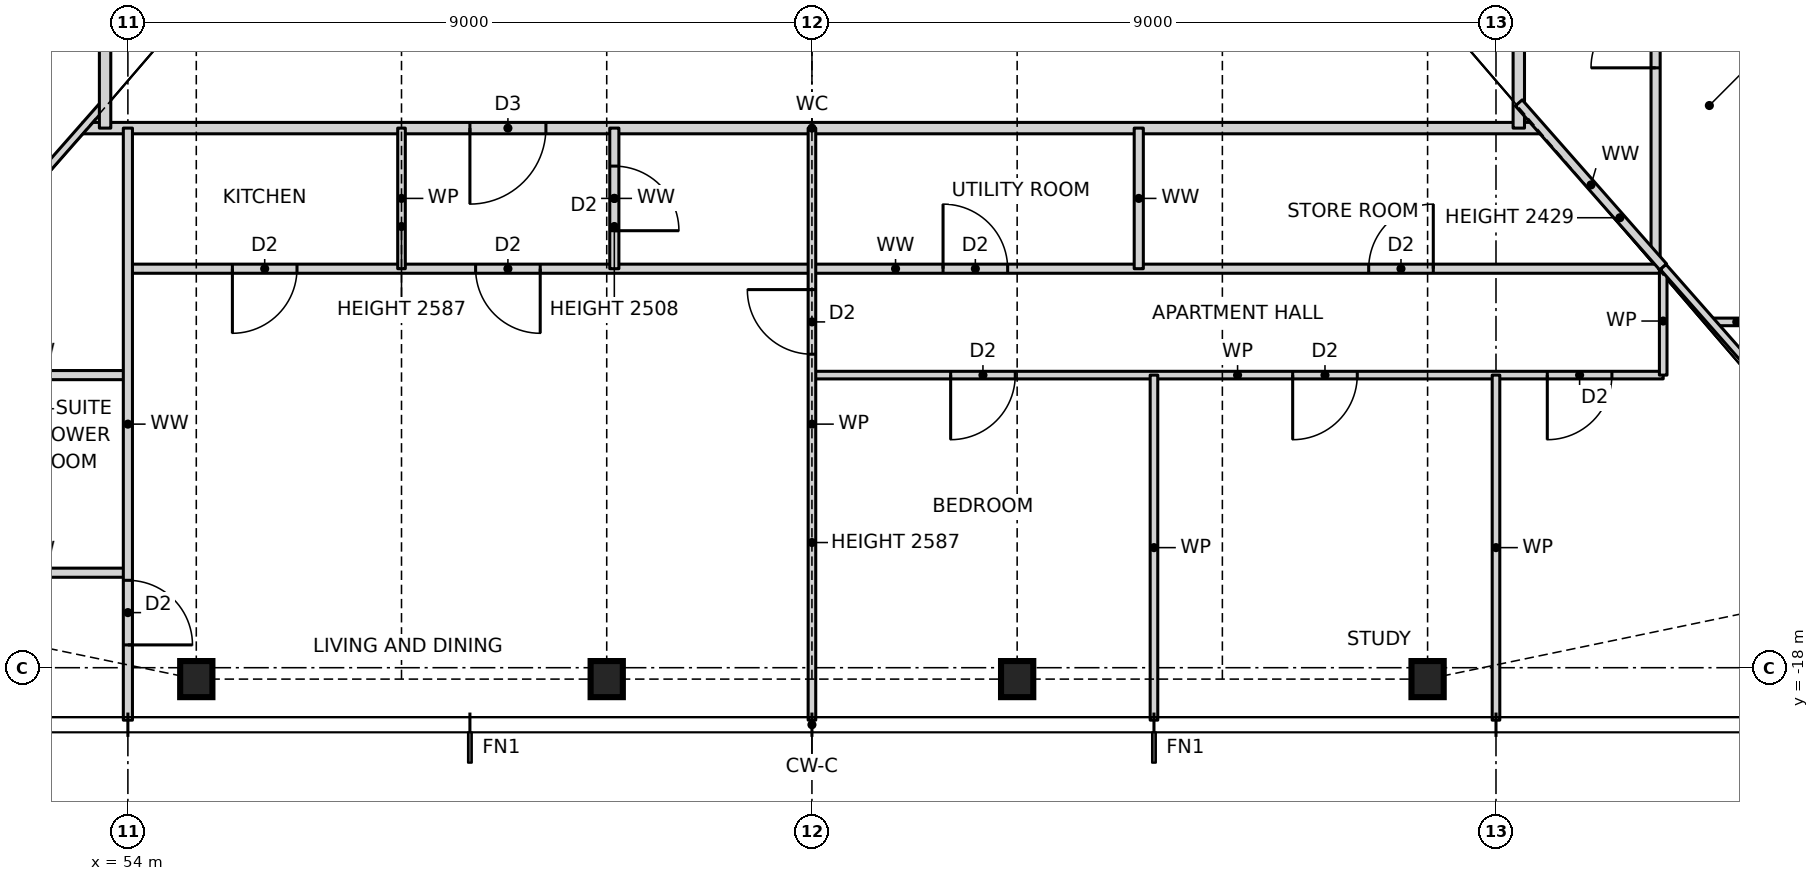
"""IFC4 building model, lengths in metres.
Left out: names, types, materials, properties, quantities, classifications, styles, units other than length and angle.
Written with IfcOpenShell. Run it as: python <this file> out.ifc"""

import sys

from ifc_helpers import new_model, si_unit, direction, frame, frame_2d, origin, origin_2d, place, context, subcontext, project, spatial, rectangle, i_section, extrude, element, fill, save


model = new_model("IFC4")
c1 = context("Model", 3, precision=1e-05, world=origin(), true_north=direction((0.0, 1.0)))
c2 = subcontext(c1, "Body", "Model", "MODEL_VIEW")
j1 = project(units=[si_unit("LENGTHUNIT", "METRE"), si_unit("PLANEANGLEUNIT", "RADIAN")], contexts=[c1])
p1 = place(None, origin())
s1 = spatial("IfcSite", under=j1, at=p1, CompositionType="ELEMENT")
p2 = place(p1, origin())
s2 = spatial("IfcBuilding", under=s1, at=p2, CompositionType="ELEMENT")
p3 = place(p2, frame((0.0, 0.0, 15.0)))
s3 = spatial("IfcBuildingStorey", under=s2, at=p3, CompositionType="ELEMENT", Elevation=15.0)
for number, where, z_axis, x_axis in (
    (1, (54.9, -18.15, 0.0), (0.0, 0.0, 1.0), (1.0, 0.0, 0.0)),
    (2, (60.3, -18.15, 0.0), (0.0, 0.0, 1.0), (1.0, 0.0, 0.0)),
    (3, (65.7, -18.15, 0.0), (0.0, 0.0, 1.0), (1.0, 0.0, 0.0)),
    (4, (71.1, -18.15, 0.0), (0.0, 0.0, 1.0), (1.0, 0.0, 0.0)),
):
    element("IfcColumn", number, at=place(p3, frame(where, z_axis=z_axis, x_axis=x_axis)), inside=s3, PredefinedType="COLUMN", context=c2, shape_type="SweptSolid", body=[
        extrude(i_section(OverallWidth=0.424, OverallDepth=0.475, WebThickness=0.048, FlangeThickness=0.077, at=origin_2d()), origin(), (0.0, 0.0, 1.0), 3.5),
    ])
for number, where, z_axis, x_axis in (
    (5, (51.6, -16.75, 0.0), (0.0, 0.0, 1.0), (1.0, 0.0, 0.0)),
    (6, (51.6, -14.15, 0.0), (0.0, 0.0, 1.0), (1.0, 0.0, 0.0)),
):
    element("IfcWall", number, at=place(p3, frame(where, z_axis=z_axis, x_axis=x_axis)), inside=s3, PredefinedType="PARTITIONING", context=c2, shape_type="SweptSolid", body=[
        extrude(rectangle(XDim=2.4, YDim=0.12, at=frame_2d((1.2, 0.0))), origin(), (0.0, 0.0, 1.0), 3.27),
    ])
p4 = place(p3, frame((63.0, -14.15, 0.0), z_axis=(0.0, 0.0, 1.0), x_axis=(1.0, 0.0, 0.0)))
e7 = element("IfcWall", 7, at=p4, inside=s3, PredefinedType="PARTITIONING", context=c2, shape_type="SweptSolid", body=[
    extrude(rectangle(XDim=11.2, YDim=0.1, at=frame_2d((5.6, 0.0))), origin(), (0.0, 0.0, 1.0), 3.27),
])
p5 = place(p4, frame((1.825, 0.0, 0.0)))
e8 = element("IfcOpeningElement", 8, at=p5, cuts=e7, PredefinedType="OPENING", context=c2, shape_type="SweptSolid", body=[
    extrude(rectangle(XDim=0.85, YDim=2.1, at=frame_2d((0.425, 1.05))), frame((0.0, 0.06, 0.0), z_axis=(0.0, -1.0, 0.0), x_axis=(1.0, 0.0, 0.0)), (0.0, 0.0, 1.0), 0.12),
])
p6 = place(p4, frame((6.325, 0.0, 0.0)))
e9 = element("IfcOpeningElement", 9, at=p6, cuts=e7, PredefinedType="OPENING", context=c2, shape_type="SweptSolid", body=[
    extrude(rectangle(XDim=0.85, YDim=2.1, at=frame_2d((0.425, 1.05))), frame((0.0, 0.06, 0.0), z_axis=(0.0, -1.0, 0.0), x_axis=(1.0, 0.0, 0.0)), (0.0, 0.0, 1.0), 0.12),
])
p7 = place(p4, frame((9.675, 0.0, 0.0)))
e10 = element("IfcOpeningElement", 10, at=p7, cuts=e7, PredefinedType="OPENING", context=c2, shape_type="SweptSolid", body=[
    extrude(rectangle(XDim=0.85, YDim=2.1, at=frame_2d((0.425, 1.05))), frame((0.0, 0.06, 0.0), z_axis=(0.0, -1.0, 0.0), x_axis=(1.0, 0.0, 0.0)), (0.0, 0.0, 1.0), 0.12),
])
p8 = place(p3, frame((74.836, -13.45, 0.0), z_axis=(0.0, 0.0, 1.0), x_axis=(1.0, 0.0, 0.0)))
e11 = element("IfcWall", 11, at=p8, inside=s3, PredefinedType="PARTITIONING", context=c2, shape_type="SweptSolid", body=[
    extrude(rectangle(XDim=0.664, YDim=0.1, at=frame_2d((0.332, 0.0))), origin(), (0.0, 0.0, 1.0), 3.27),
])
p9 = place(p3, frame((54.0, -12.75, 0.0), z_axis=(0.0, 0.0, 1.0), x_axis=(1.0, 0.0, 0.0)))
e12 = element("IfcWall", 12, at=p9, inside=s3, PredefinedType="PARTITIONING", context=c2, shape_type="SweptSolid", body=[
    extrude(rectangle(XDim=20.2, YDim=0.12, at=frame_2d((10.1, 0.0))), origin(), (0.0, 0.0, 1.0), 3.27),
])
p10 = place(p9, frame((1.375, 0.0, 0.0)))
e13 = element("IfcOpeningElement", 13, at=p10, cuts=e12, PredefinedType="OPENING", context=c2, shape_type="SweptSolid", body=[
    extrude(rectangle(XDim=0.85, YDim=2.1, at=frame_2d((0.425, 1.05))), frame((0.0, 0.07, 0.0), z_axis=(0.0, -1.0, 0.0), x_axis=(1.0, 0.0, 0.0)), (0.0, 0.0, 1.0), 0.14),
])
p11 = place(p9, frame((4.575, 0.0, 0.0)))
e14 = element("IfcOpeningElement", 14, at=p11, cuts=e12, PredefinedType="OPENING", context=c2, shape_type="SweptSolid", body=[
    extrude(rectangle(XDim=0.85, YDim=2.1, at=frame_2d((0.425, 1.05))), frame((0.0, 0.07, 0.0), z_axis=(0.0, -1.0, 0.0), x_axis=(1.0, 0.0, 0.0)), (0.0, 0.0, 1.0), 0.14),
])
p12 = place(p9, frame((10.725, 0.0, 0.0)))
e15 = element("IfcOpeningElement", 15, at=p12, cuts=e12, PredefinedType="OPENING", context=c2, shape_type="SweptSolid", body=[
    extrude(rectangle(XDim=0.85, YDim=2.1, at=frame_2d((0.425, 1.05))), frame((0.0, 0.07, 0.0), z_axis=(0.0, -1.0, 0.0), x_axis=(1.0, 0.0, 0.0)), (0.0, 0.0, 1.0), 0.14),
])
p13 = place(p9, frame((16.325, 0.0, 0.0)))
e16 = element("IfcOpeningElement", 16, at=p13, cuts=e12, PredefinedType="OPENING", context=c2, shape_type="SweptSolid", body=[
    extrude(rectangle(XDim=0.85, YDim=2.1, at=frame_2d((0.425, 1.05))), frame((0.0, 0.07, 0.0), z_axis=(0.0, -1.0, 0.0), x_axis=(1.0, 0.0, 0.0)), (0.0, 0.0, 1.0), 0.14),
])
p14 = place(p3, frame((53.408, -10.9, 0.0), z_axis=(0.0, 0.0, 1.0), x_axis=(1.0, 0.0, 0.0)))
e17 = element("IfcWall", 17, at=p14, inside=s3, PredefinedType="PARTITIONING", context=c2, shape_type="SweptSolid", body=[
    extrude(rectangle(XDim=19.184, YDim=0.15, at=frame_2d((9.592, 0.0))), origin(), (0.0, 0.0, 1.0), 3.27),
])
p15 = place(p14, frame((5.092, 0.0, 0.0)))
e18 = element("IfcOpeningElement", 18, at=p15, cuts=e17, PredefinedType="OPENING", context=c2, shape_type="SweptSolid", body=[
    extrude(rectangle(XDim=1.0, YDim=2.1, at=frame_2d((0.5, 1.05))), frame((0.0, 0.085, 0.0), z_axis=(0.0, -1.0, 0.0), x_axis=(1.0, 0.0, 0.0)), (0.0, 0.0, 1.0), 0.17),
])
p16 = place(p3, frame((47.944, -17.109, 0.0), z_axis=(0.0, 0.0, 1.0), x_axis=(0.660612734851, 0.750726857487, 0.0)))
e19 = element("IfcWall", 19, at=p16, inside=s3, PredefinedType="PARTITIONING", context=c2, shape_type="SweptSolid", body=[
    extrude(rectangle(XDim=8.713, YDim=0.1, at=frame_2d((4.356, 0.0))), origin(), (0.0, 0.0, 1.0), 2.429),
])
p17 = place(p3, frame((74.2, -14.15, 0.0), z_axis=(0.0, 0.0, 1.0), x_axis=(0.0, 1.0, 0.0)))
e20 = element("IfcWall", 20, at=p17, inside=s3, PredefinedType="PARTITIONING", context=c2, shape_type="SweptSolid", body=[
    extrude(rectangle(XDim=1.423, YDim=0.1, at=frame_2d((0.711, 0.0))), origin(), (0.0, 0.0, 1.0), 3.27),
])
p18 = place(p3, frame((74.1, -12.614, 0.0), z_axis=(0.0, 0.0, 1.0), x_axis=(0.0, 1.0, 0.0)))
e21 = element("IfcWall", 21, at=p18, inside=s3, PredefinedType="PARTITIONING", context=c2, shape_type="SweptSolid", body=[
    extrude(rectangle(XDim=25.228, YDim=0.12, at=frame_2d((12.614, 0.0))), origin(), (0.0, 0.0, 1.0), 3.27),
])
p19 = place(p18, frame((7.239, 0.0, 0.0)))
e22 = element("IfcOpeningElement", 22, at=p19, cuts=e21, PredefinedType="OPENING", context=c2, shape_type="SweptSolid", body=[
    extrude(rectangle(XDim=0.85, YDim=2.1, at=frame_2d((0.425, 1.05))), frame((0.0, 0.07, 0.0), z_axis=(0.0, -1.0, 0.0), x_axis=(1.0, 0.0, 0.0)), (0.0, 0.0, 1.0), 0.14),
])
p20 = place(p18, frame((10.439, 0.0, 0.0)))
e23 = element("IfcOpeningElement", 23, at=p20, cuts=e21, PredefinedType="OPENING", context=c2, shape_type="SweptSolid", body=[
    extrude(rectangle(XDim=0.85, YDim=2.1, at=frame_2d((0.425, 1.05))), frame((0.0, 0.07, 0.0), z_axis=(0.0, -1.0, 0.0), x_axis=(1.0, 0.0, 0.0)), (0.0, 0.0, 1.0), 0.14),
])
p21 = place(p18, frame((2.507, 0.0, 0.0)))
e24 = element("IfcOpeningElement", 24, at=p21, cuts=e21, PredefinedType="OPENING", context=c2, shape_type="SweptSolid", body=[
    extrude(rectangle(XDim=0.85, YDim=2.1, at=frame_2d((0.425, 1.05))), frame((0.0, 0.07, 0.0), z_axis=(0.0, -1.0, 0.0), x_axis=(1.0, 0.0, 0.0)), (0.0, 0.0, 1.0), 0.14),
])
p22 = place(p18, frame((16.639, 0.0, 0.0)))
e25 = element("IfcOpeningElement", 25, at=p22, cuts=e21, PredefinedType="OPENING", context=c2, shape_type="SweptSolid", body=[
    extrude(rectangle(XDim=0.85, YDim=2.1, at=frame_2d((0.425, 1.05))), frame((0.0, 0.07, 0.0), z_axis=(0.0, -1.0, 0.0), x_axis=(1.0, 0.0, 0.0)), (0.0, 0.0, 1.0), 0.14),
])
p23 = place(p18, frame((21.821, 0.0, 0.0)))
e26 = element("IfcOpeningElement", 26, at=p23, cuts=e21, PredefinedType="OPENING", context=c2, shape_type="SweptSolid", body=[
    extrude(rectangle(XDim=0.85, YDim=2.1, at=frame_2d((0.425, 1.05))), frame((0.0, 0.07, 0.0), z_axis=(0.0, -1.0, 0.0), x_axis=(1.0, 0.0, 0.0)), (0.0, 0.0, 1.0), 0.14),
])
p24 = place(p3, frame((72.3, -10.9, 0.0), z_axis=(0.0, 0.0, 1.0), x_axis=(0.0, 1.0, 0.0)))
e27 = element("IfcWall", 27, at=p24, inside=s3, PredefinedType="PARTITIONING", context=c2, shape_type="SweptSolid", body=[
    extrude(rectangle(XDim=21.468, YDim=0.15, at=frame_2d((10.734, 0.0))), origin(), (0.0, 0.0, 1.0), 3.27),
])
p25 = place(p24, frame((8.65, 0.0, 0.0)))
e28 = element("IfcOpeningElement", 28, at=p25, cuts=e27, PredefinedType="OPENING", context=c2, shape_type="SweptSolid", body=[
    extrude(rectangle(XDim=1.0, YDim=2.1, at=frame_2d((0.5, 1.05))), frame((0.0, 0.085, 0.0), z_axis=(0.0, -1.0, 0.0), x_axis=(1.0, 0.0, 0.0)), (0.0, 0.0, 1.0), 0.17),
])
for number, where, z_axis, x_axis in (
    (29, (72.0, -18.69, 0.0), (0.0, 0.0, 1.0), (0.0, 1.0, 0.0)),
    (30, (67.5, -18.69, 0.0), (0.0, 0.0, 1.0), (0.0, 1.0, 0.0)),
):
    element("IfcWall", number, at=place(p3, frame(where, z_axis=z_axis, x_axis=x_axis)), inside=s3, PredefinedType="PARTITIONING", context=c2, shape_type="SweptSolid", body=[
        extrude(rectangle(XDim=4.54, YDim=0.1, at=frame_2d((2.27, 0.0))), origin(), (0.0, 0.0, 1.0), 3.27),
    ])
p26 = place(p3, frame((67.3, -12.75, 0.0), z_axis=(0.0, 0.0, 1.0), x_axis=(0.0, 1.0, 0.0)))
e31 = element("IfcWall", 31, at=p26, inside=s3, PredefinedType="PARTITIONING", context=c2, shape_type="SweptSolid", body=[
    extrude(rectangle(XDim=1.85, YDim=0.12, at=frame_2d((0.925, 0.0))), origin(), (0.0, 0.0, 1.0), 3.27),
])
p27 = place(p3, frame((63.0, -18.69, 0.0), z_axis=(0.0, 0.0, 1.0), x_axis=(0.0, 1.0, 0.0)))
e32 = element("IfcWall", 32, at=p27, inside=s3, PredefinedType="PARTITIONING", context=c2, shape_type="SweptSolid", body=[
    extrude(rectangle(XDim=7.79, YDim=0.1, at=frame_2d((3.895, 0.0))), origin(), (0.0, 0.0, 1.0), 2.587),
])
p28 = place(p27, frame((4.815, 0.0, 0.0)))
e33 = element("IfcOpeningElement", 33, at=p28, cuts=e32, PredefinedType="OPENING", context=c2, shape_type="SweptSolid", body=[
    extrude(rectangle(XDim=0.85, YDim=2.1, at=frame_2d((0.425, 1.05))), frame((0.0, 0.06, 0.0), z_axis=(0.0, -1.0, 0.0), x_axis=(1.0, 0.0, 0.0)), (0.0, 0.0, 1.0), 0.12),
])
p29 = place(p3, frame((60.4, -12.75, 0.0), z_axis=(0.0, 0.0, 1.0), x_axis=(0.0, 1.0, 0.0)))
e34 = element("IfcWall", 34, at=p29, inside=s3, PredefinedType="PARTITIONING", context=c2, shape_type="SweptSolid", body=[
    extrude(rectangle(XDim=1.85, YDim=0.12, at=frame_2d((0.925, 0.0))), origin(), (0.0, 0.0, 1.0), 2.508),
])
p30 = place(p29, frame((0.5, 0.0, 0.0)))
e35 = element("IfcOpeningElement", 35, at=p30, cuts=e34, PredefinedType="OPENING", context=c2, shape_type="SweptSolid", body=[
    extrude(rectangle(XDim=0.85, YDim=2.1, at=frame_2d((0.425, 1.05))), frame((0.0, 0.07, 0.0), z_axis=(0.0, -1.0, 0.0), x_axis=(1.0, 0.0, 0.0)), (0.0, 0.0, 1.0), 0.14),
])
p31 = place(p3, frame((57.6, -12.75, 0.0), z_axis=(0.0, 0.0, 1.0), x_axis=(0.0, 1.0, 0.0)))
e36 = element("IfcWall", 36, at=p31, inside=s3, PredefinedType="PARTITIONING", context=c2, shape_type="SweptSolid", body=[
    extrude(rectangle(XDim=1.85, YDim=0.1, at=frame_2d((0.925, 0.0))), origin(), (0.0, 0.0, 1.0), 2.587),
])
p32 = place(p3, frame((54.0, -18.69, 0.0), z_axis=(0.0, 0.0, 1.0), x_axis=(0.0, 1.0, 0.0)))
e37 = element("IfcWall", 37, at=p32, inside=s3, PredefinedType="PARTITIONING", context=c2, shape_type="SweptSolid", body=[
    extrude(rectangle(XDim=7.79, YDim=0.12, at=frame_2d((3.895, 0.0))), origin(), (0.0, 0.0, 1.0), 3.27),
])
p33 = place(p32, frame((0.99, 0.0, 0.0)))
e38 = element("IfcOpeningElement", 38, at=p33, cuts=e37, PredefinedType="OPENING", context=c2, shape_type="SweptSolid", body=[
    extrude(rectangle(XDim=0.85, YDim=2.1, at=frame_2d((0.425, 1.05))), frame((0.0, 0.07, 0.0), z_axis=(0.0, -1.0, 0.0), x_axis=(1.0, 0.0, 0.0)), (0.0, 0.0, 1.0), 0.14),
])
p34 = place(p3, frame((53.7, -10.9, 0.0), z_axis=(0.0, 0.0, 1.0), x_axis=(0.0, 1.0, 0.0)))
e39 = element("IfcWall", 39, at=p34, inside=s3, PredefinedType="PARTITIONING", context=c2, shape_type="SweptSolid", body=[
    extrude(rectangle(XDim=21.468, YDim=0.15, at=frame_2d((10.734, 0.0))), origin(), (0.0, 0.0, 1.0), 3.27),
])
p35 = place(p34, frame((7.65, 0.0, 0.0)))
e40 = element("IfcOpeningElement", 40, at=p35, cuts=e39, PredefinedType="OPENING", context=c2, shape_type="SweptSolid", body=[
    extrude(rectangle(XDim=1.0, YDim=2.1, at=frame_2d((0.5, 1.05))), frame((0.0, 0.085, 0.0), z_axis=(0.0, -1.0, 0.0), x_axis=(1.0, 0.0, 0.0)), (0.0, 0.0, 1.0), 0.17),
])
p36 = place(p3, frame((74.2, -12.727, 0.0), z_axis=(0.0, 0.0, 1.0), x_axis=(-0.66059344937, 0.75074382758, 0.0)))
e41 = element("IfcWall", 41, at=p36, inside=s3, PredefinedType="PARTITIONING", context=c2, shape_type="SweptSolid", body=[
    extrude(rectangle(XDim=2.876, YDim=0.12, at=frame_2d((1.438, 0.0))), origin(), (0.0, 0.0, 1.0), 2.429),
])
p37 = place(p3, frame((78.057, -17.109, 0.0), z_axis=(0.0, 0.0, 1.0), x_axis=(-0.660654290516, 0.750690287951, 0.0)))
e42 = element("IfcWall", 42, at=p37, inside=s3, PredefinedType="PARTITIONING", context=c2, shape_type="SweptSolid", body=[
    extrude(rectangle(XDim=5.838, YDim=0.1, at=frame_2d((2.919, 0.0))), origin(), (0.0, 0.0, 1.0), 2.429),
])
p38 = place(p10, frame((0.85, 0.0, 0.0), z_axis=(0.0, 0.0, 1.0), x_axis=(-1.0, 0.0, 0.0)))
e43 = element("IfcDoor", 43, at=p38, inside=s3, OperationType="SINGLE_SWING_RIGHT", PredefinedType="DOOR", context=c2, shape_type="SweptSolid", body=[
    extrude(rectangle(XDim=0.85, YDim=2.1, at=frame_2d((0.425, 1.05))), frame((0.0, 0.025, 0.0), z_axis=(0.0, -1.0, 0.0), x_axis=(1.0, 0.0, 0.0)), (0.0, 0.0, 1.0), 0.05),
])
fill(e13, e43)
p39 = place(p15, frame((1.0, 0.0, 0.0), z_axis=(0.0, 0.0, 1.0), x_axis=(-1.0, 0.0, 0.0)))
e44 = element("IfcDoor", 44, at=p39, inside=s3, OperationType="SINGLE_SWING_RIGHT", PredefinedType="DOOR", context=c2, shape_type="SweptSolid", body=[
    extrude(rectangle(XDim=1.0, YDim=2.1, at=frame_2d((0.5, 1.05))), frame((0.0, 0.025, 0.0), z_axis=(0.0, -1.0, 0.0), x_axis=(1.0, 0.0, 0.0)), (0.0, 0.0, 1.0), 0.05),
])
fill(e18, e44)
p40 = place(p11, frame((0.85, 0.0, 0.0), z_axis=(0.0, 0.0, 1.0), x_axis=(-1.0, 0.0, 0.0)))
e45 = element("IfcDoor", 45, at=p40, inside=s3, OperationType="SINGLE_SWING_LEFT", PredefinedType="DOOR", context=c2, shape_type="SweptSolid", body=[
    extrude(rectangle(XDim=0.85, YDim=2.1, at=frame_2d((0.425, 1.05))), frame((0.0, 0.025, 0.0), z_axis=(0.0, -1.0, 0.0), x_axis=(1.0, 0.0, 0.0)), (0.0, 0.0, 1.0), 0.05),
])
fill(e14, e45)
p41 = place(p30, frame((0.85, 0.0, 0.0), z_axis=(0.0, 0.0, 1.0), x_axis=(-1.0, 0.0, 0.0)))
e46 = element("IfcDoor", 46, at=p41, inside=s3, OperationType="SINGLE_SWING_RIGHT", PredefinedType="DOOR", context=c2, shape_type="SweptSolid", body=[
    extrude(rectangle(XDim=0.85, YDim=2.1, at=frame_2d((0.425, 1.05))), frame((0.0, 0.025, 0.0), z_axis=(0.0, -1.0, 0.0), x_axis=(1.0, 0.0, 0.0)), (0.0, 0.0, 1.0), 0.05),
])
fill(e35, e46)
p42 = place(p33, frame((0.85, 0.0, 0.0), z_axis=(0.0, 0.0, 1.0), x_axis=(-1.0, 0.0, 0.0)))
e47 = element("IfcDoor", 47, at=p42, inside=s3, OperationType="SINGLE_SWING_RIGHT", PredefinedType="DOOR", context=c2, shape_type="SweptSolid", body=[
    extrude(rectangle(XDim=0.85, YDim=2.1, at=frame_2d((0.425, 1.05))), frame((0.0, 0.025, 0.0), z_axis=(0.0, -1.0, 0.0), x_axis=(1.0, 0.0, 0.0)), (0.0, 0.0, 1.0), 0.05),
])
fill(e38, e47)
p43 = place(p28, origin())
e48 = element("IfcDoor", 48, at=p43, inside=s3, OperationType="SINGLE_SWING_RIGHT", PredefinedType="DOOR", context=c2, shape_type="SweptSolid", body=[
    extrude(rectangle(XDim=0.85, YDim=2.1, at=frame_2d((0.425, 1.05))), frame((0.0, 0.025, 0.0), z_axis=(0.0, -1.0, 0.0), x_axis=(1.0, 0.0, 0.0)), (0.0, 0.0, 1.0), 0.05),
])
fill(e33, e48)
p44 = place(p5, frame((0.85, 0.0, 0.0), z_axis=(0.0, 0.0, 1.0), x_axis=(-1.0, 0.0, 0.0)))
e49 = element("IfcDoor", 49, at=p44, inside=s3, OperationType="SINGLE_SWING_RIGHT", PredefinedType="DOOR", context=c2, shape_type="SweptSolid", body=[
    extrude(rectangle(XDim=0.85, YDim=2.1, at=frame_2d((0.425, 1.05))), frame((0.0, 0.025, 0.0), z_axis=(0.0, -1.0, 0.0), x_axis=(1.0, 0.0, 0.0)), (0.0, 0.0, 1.0), 0.05),
])
fill(e8, e49)
p45 = place(p6, frame((0.85, 0.0, 0.0), z_axis=(0.0, 0.0, 1.0), x_axis=(-1.0, 0.0, 0.0)))
e50 = element("IfcDoor", 50, at=p45, inside=s3, OperationType="SINGLE_SWING_RIGHT", PredefinedType="DOOR", context=c2, shape_type="SweptSolid", body=[
    extrude(rectangle(XDim=0.85, YDim=2.1, at=frame_2d((0.425, 1.05))), frame((0.0, 0.025, 0.0), z_axis=(0.0, -1.0, 0.0), x_axis=(1.0, 0.0, 0.0)), (0.0, 0.0, 1.0), 0.05),
])
fill(e9, e50)
p46 = place(p7, frame((0.85, 0.0, 0.0), z_axis=(0.0, 0.0, 1.0), x_axis=(-1.0, 0.0, 0.0)))
e51 = element("IfcDoor", 51, at=p46, inside=s3, OperationType="SINGLE_SWING_RIGHT", PredefinedType="DOOR", context=c2, shape_type="SweptSolid", body=[
    extrude(rectangle(XDim=0.85, YDim=2.1, at=frame_2d((0.425, 1.05))), frame((0.0, 0.025, 0.0), z_axis=(0.0, -1.0, 0.0), x_axis=(1.0, 0.0, 0.0)), (0.0, 0.0, 1.0), 0.05),
])
fill(e10, e51)
p47 = place(p12, origin())
e52 = element("IfcDoor", 52, at=p47, inside=s3, OperationType="SINGLE_SWING_LEFT", PredefinedType="DOOR", context=c2, shape_type="SweptSolid", body=[
    extrude(rectangle(XDim=0.85, YDim=2.1, at=frame_2d((0.425, 1.05))), frame((0.0, 0.025, 0.0), z_axis=(0.0, -1.0, 0.0), x_axis=(1.0, 0.0, 0.0)), (0.0, 0.0, 1.0), 0.05),
])
fill(e15, e52)
p48 = place(p13, origin())
e53 = element("IfcDoor", 53, at=p48, inside=s3, OperationType="SINGLE_SWING_RIGHT", PredefinedType="DOOR", context=c2, shape_type="SweptSolid", body=[
    extrude(rectangle(XDim=0.85, YDim=2.1, at=frame_2d((0.425, 1.05))), frame((0.0, 0.025, 0.0), z_axis=(0.0, -1.0, 0.0), x_axis=(1.0, 0.0, 0.0)), (0.0, 0.0, 1.0), 0.05),
])
fill(e16, e53)
p49 = place(p21, origin())
e54 = element("IfcDoor", 54, at=p49, inside=s3, OperationType="SINGLE_SWING_LEFT", PredefinedType="DOOR", context=c2, shape_type="SweptSolid", body=[
    extrude(rectangle(XDim=0.85, YDim=2.1, at=frame_2d((0.425, 1.05))), frame((0.0, 0.025, 0.0), z_axis=(0.0, -1.0, 0.0), x_axis=(1.0, 0.0, 0.0)), (0.0, 0.0, 1.0), 0.05),
])
fill(e24, e54)
save(model, sys.argv[1])
